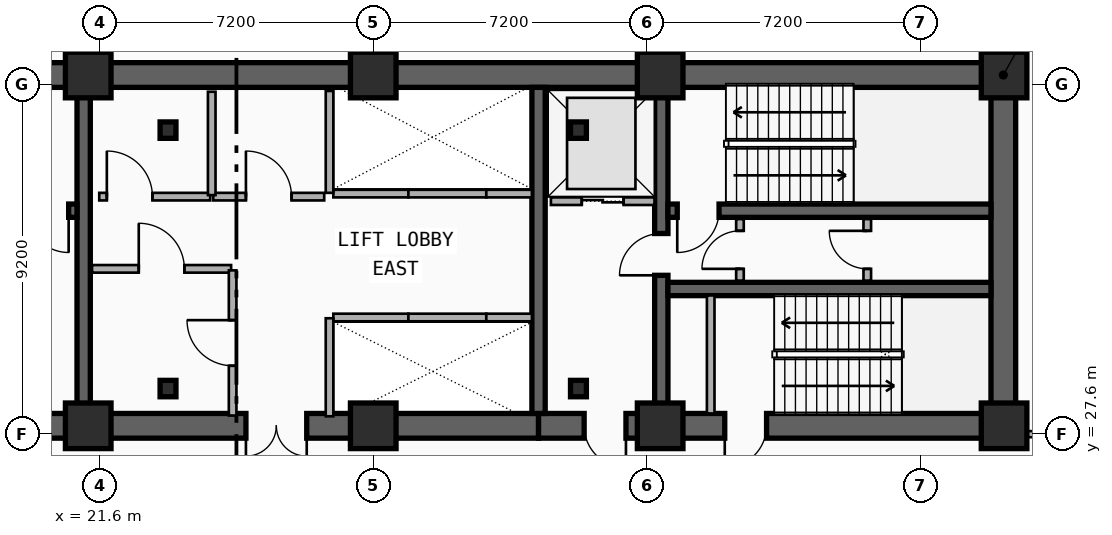
"""IFC4 building model, lengths in metres.
Left out: names, types, materials, properties, quantities, classifications, styles, units other than length and angle.
Written with IfcOpenShell. Run it as: python <this file> out.ifc"""

import sys

from ifc_helpers import new_model, si_unit, direction, frame, frame_2d, origin, origin_2d, place, context, subcontext, project, spatial, rectangle, i_section, extrude, element, fill, save


model = new_model("IFC4")
c1 = context("Model", 3, precision=1e-05, world=origin(), true_north=direction((0.0, 1.0)))
c2 = subcontext(c1, "Body", "Model", "MODEL_VIEW")
j1 = project(units=[si_unit("LENGTHUNIT", "METRE"), si_unit("PLANEANGLEUNIT", "RADIAN")], contexts=[c1])
p1 = place(None, origin())
s1 = spatial("IfcSite", under=j1, at=p1, CompositionType="ELEMENT")
p2 = place(p1, origin())
s2 = spatial("IfcBuilding", under=s1, at=p2, CompositionType="ELEMENT")
p3 = place(p2, frame((0.0, 0.0, 132.9)))
s3 = spatial("IfcBuildingStorey", under=s2, at=p3, CompositionType="ELEMENT", Elevation=132.9)
p4 = place(p3, frame((12.15, 37.05, 0.0), z_axis=(0.0, 0.0, 1.0), x_axis=(1.0, 0.0, 0.0)))
e1 = element("IfcWall", 1, at=p4, inside=s3, PredefinedType="SHEAR", context=c2, shape_type="SweptSolid", body=[
    extrude(rectangle(XDim=33.23, YDim=0.65, at=frame_2d((16.615, 0.0))), origin(), (0.0, 0.0, 1.0), 4.8),
])
p5 = place(p3, frame((21.18, 27.82, 0.0), z_axis=(0.0, 0.0, 1.0), x_axis=(-1.0, 0.0, 0.0)))
e2 = element("IfcWall", 2, at=p5, inside=s3, PredefinedType="SHEAR", context=c2, shape_type="SweptSolid", body=[
    extrude(rectangle(XDim=9.03, YDim=0.65, at=frame_2d((4.515, 0.0))), origin(), (0.0, 0.0, 1.0), 4.8),
])
p6 = place(p5, frame((2.68, 0.0, 0.0)))
e3 = element("IfcOpeningElement", 3, at=p6, cuts=e2, PredefinedType="OPENING", context=c2, shape_type="SweptSolid", body=[
    extrude(rectangle(XDim=1.1, YDim=2.15, at=frame_2d((0.55, 1.075))), frame((0.0, 0.335, 0.0), z_axis=(0.0, -1.0, 0.0), x_axis=(1.0, 0.0, 0.0)), (0.0, 0.0, 1.0), 0.67),
])
p7 = place(p3, frame((33.15, 27.82, 0.0), z_axis=(0.0, 0.0, 1.0), x_axis=(-1.0, 0.0, 0.0)))
e4 = element("IfcWall", 4, at=p7, inside=s3, PredefinedType="SHEAR", context=c2, shape_type="SweptSolid", body=[
    extrude(rectangle(XDim=11.97, YDim=0.65, at=frame_2d((5.985, 0.0))), origin(), (0.0, 0.0, 1.0), 4.8),
])
p8 = place(p7, frame((6.1, 0.0, 0.0)))
e5 = element("IfcOpeningElement", 5, at=p8, cuts=e4, PredefinedType="OPENING", context=c2, shape_type="SweptSolid", body=[
    extrude(rectangle(XDim=1.6, YDim=2.2, at=frame_2d((0.8, 1.1))), frame((0.0, 0.335, 0.0), z_axis=(0.0, -1.0, 0.0), x_axis=(1.0, 0.0, 0.0)), (0.0, 0.0, 1.0), 0.67),
])
p9 = place(p3, frame((45.38, 27.82, 0.0), z_axis=(0.0, 0.0, 1.0), x_axis=(-1.0, 0.0, 0.0)))
e6 = element("IfcWall", 6, at=p9, inside=s3, PredefinedType="SHEAR", context=c2, shape_type="SweptSolid", body=[
    extrude(rectangle(XDim=12.23, YDim=0.65, at=frame_2d((6.115, 0.0))), origin(), (0.0, 0.0, 1.0), 4.8),
])
p10 = place(p9, frame((9.93, 0.0, 0.0)))
e7 = element("IfcOpeningElement", 7, at=p10, cuts=e6, PredefinedType="OPENING", context=c2, shape_type="SweptSolid", body=[
    extrude(rectangle(XDim=1.1, YDim=2.15, at=frame_2d((0.55, 1.075))), frame((0.0, 0.335, 0.0), z_axis=(0.0, -1.0, 0.0), x_axis=(1.0, 0.0, 0.0)), (0.0, 0.0, 1.0), 0.67),
])
p11 = place(p9, frame((6.23, 0.0, 0.0)))
e8 = element("IfcOpeningElement", 8, at=p11, cuts=e6, PredefinedType="OPENING", context=c2, shape_type="SweptSolid", body=[
    extrude(rectangle(XDim=1.1, YDim=2.15, at=frame_2d((0.55, 1.075))), frame((0.0, 0.335, 0.0), z_axis=(0.0, -1.0, 0.0), x_axis=(1.0, 0.0, 0.0)), (0.0, 0.0, 1.0), 0.67),
])
p12 = place(p3, frame((45.38, 28.145, 0.0), z_axis=(0.0, 0.0, 1.0), x_axis=(0.0, 1.0, 0.0)))
e9 = element("IfcWall", 9, at=p12, inside=s3, PredefinedType="SHEAR", context=c2, shape_type="SweptSolid", body=[
    extrude(rectangle(XDim=8.58, YDim=0.65, at=frame_2d((4.29, 0.0))), origin(), (0.0, 0.0, 1.0), 4.8),
])
for number, where, z_axis, x_axis in (
    (10, (21.18, 28.145, 0.0), (0.0, 0.0, 1.0), (0.0, 1.0, 0.0)),
    (11, (33.15, 28.145, 0.0), (0.0, 0.0, 1.0), (0.0, 1.0, 0.0)),
):
    element("IfcWall", number, at=place(p3, frame(where, z_axis=z_axis, x_axis=x_axis)), inside=s3, PredefinedType="SHEAR", context=c2, shape_type="SweptSolid", body=[
        extrude(rectangle(XDim=8.58, YDim=0.35, at=frame_2d((4.29, 0.0))), origin(), (0.0, 0.0, 1.0), 4.8),
    ])
p13 = place(p3, frame((36.38, 28.145, 0.0), z_axis=(0.0, 0.0, 1.0), x_axis=(0.0, 1.0, 0.0)))
e12 = element("IfcWall", 12, at=p13, inside=s3, PredefinedType="SHEAR", context=c2, shape_type="SweptSolid", body=[
    extrude(rectangle(XDim=8.58, YDim=0.35, at=frame_2d((4.29, 0.0))), origin(), (0.0, 0.0, 1.0), 4.8),
])
p14 = place(p13, frame((3.635, 0.0, 0.0)))
e13 = element("IfcOpeningElement", 13, at=p14, cuts=e12, PredefinedType="OPENING", context=c2, shape_type="SweptSolid", body=[
    extrude(rectangle(XDim=1.1, YDim=2.15, at=frame_2d((0.55, 1.075))), frame((0.0, 0.185, 0.0), z_axis=(0.0, -1.0, 0.0), x_axis=(1.0, 0.0, 0.0)), (0.0, 0.0, 1.0), 0.37),
])
p15 = place(p3, frame((21.005, 33.48, 0.0), z_axis=(0.0, 0.0, 1.0), x_axis=(-1.0, 0.0, 0.0)))
e14 = element("IfcWall", 14, at=p15, inside=s3, PredefinedType="SHEAR", context=c2, shape_type="SweptSolid", body=[
    extrude(rectangle(XDim=8.53, YDim=0.35, at=frame_2d((4.265, 0.0))), origin(), (0.0, 0.0, 1.0), 4.8),
])
p16 = place(p15, frame((0.22, 0.0, 0.0)))
e15 = element("IfcOpeningElement", 15, at=p16, cuts=e14, PredefinedType="OPENING", context=c2, shape_type="SweptSolid", body=[
    extrude(rectangle(XDim=1.1, YDim=2.15, at=frame_2d((0.55, 1.075))), frame((0.0, 0.185, 0.0), z_axis=(0.0, -1.0, 0.0), x_axis=(1.0, 0.0, 0.0)), (0.0, 0.0, 1.0), 0.37),
])
p17 = place(p3, frame((45.055, 33.48, 0.0), z_axis=(0.0, 0.0, 1.0), x_axis=(-1.0, 0.0, 0.0)))
e16 = element("IfcWall", 16, at=p17, inside=s3, PredefinedType="SHEAR", context=c2, shape_type="SweptSolid", body=[
    extrude(rectangle(XDim=8.5, YDim=0.35, at=frame_2d((4.25, 0.0))), origin(), (0.0, 0.0, 1.0), 4.8),
])
p18 = place(p17, frame((7.155, 0.0, 0.0)))
e17 = element("IfcOpeningElement", 17, at=p18, cuts=e16, PredefinedType="OPENING", context=c2, shape_type="SweptSolid", body=[
    extrude(rectangle(XDim=1.1, YDim=2.15, at=frame_2d((0.55, 1.075))), frame((0.0, 0.185, 0.0), z_axis=(0.0, -1.0, 0.0), x_axis=(1.0, 0.0, 0.0)), (0.0, 0.0, 1.0), 0.37),
])
p19 = place(p3, frame((36.555, 31.42, 0.0), z_axis=(0.0, 0.0, 1.0), x_axis=(1.0, 0.0, 0.0)))
e18 = element("IfcWall", 18, at=p19, inside=s3, PredefinedType="SHEAR", context=c2, shape_type="SweptSolid", body=[
    extrude(rectangle(XDim=8.5, YDim=0.35, at=frame_2d((4.25, 0.0))), origin(), (0.0, 0.0, 1.0), 4.8),
])
for number, where, z_axis, x_axis in (
    (19, (23.4, 28.8, 0.0), (0.0, 0.0, 1.0), (1.0, 0.0, 0.0)),
    (20, (34.2, 28.8, 0.0), (0.0, 0.0, 1.0), (1.0, 0.0, 0.0)),
    (21, (34.2, 35.6, 0.0), (0.0, 0.0, 1.0), (1.0, 0.0, 0.0)),
    (22, (23.4, 35.6, 0.0), (0.0, 0.0, 1.0), (1.0, 0.0, 0.0)),
):
    element("IfcColumn", number, at=place(p3, frame(where, z_axis=z_axis, x_axis=x_axis)), inside=s3, PredefinedType="COLUMN", context=c2, shape_type="SweptSolid", body=[
        extrude(i_section(OverallWidth=0.418, OverallDepth=0.432, WebThickness=0.035, FlangeThickness=0.056, FilletRadius=0.015, at=origin_2d()), origin(), (0.0, 0.0, 1.0), 4.8),
    ])
for number, where, z_axis, x_axis in (
    (23, (21.3, 27.82, 0.0), (0.0, 0.0, 1.0), (1.0, 0.0, 0.0)),
    (24, (21.3, 37.05, 0.0), (0.0, 0.0, 1.0), (1.0, 0.0, 0.0)),
    (25, (28.8, 27.82, 0.0), (0.0, 0.0, 1.0), (1.0, 0.0, 0.0)),
    (26, (28.8, 37.05, 0.0), (0.0, 0.0, 1.0), (1.0, 0.0, 0.0)),
    (27, (36.35, 27.82, 0.0), (0.0, 0.0, 1.0), (1.0, 0.0, 0.0)),
    (28, (36.35, 37.05, 0.0), (0.0, 0.0, 1.0), (1.0, 0.0, 0.0)),
    (29, (45.4, 27.82, 0.0), (0.0, 0.0, 1.0), (1.0, 0.0, 0.0)),
    (30, (45.4, 37.05, 0.0), (0.0, 0.0, 1.0), (1.0, 0.0, 0.0)),
):
    element("IfcColumn", number, at=place(p3, frame(where, z_axis=z_axis, x_axis=x_axis)), inside=s3, PredefinedType="COLUMN", context=c2, shape_type="SweptSolid", body=[
        extrude(rectangle(XDim=1.2, YDim=1.2, at=origin_2d()), origin(), (0.0, 0.0, 1.0), 4.8),
    ])
p20 = place(p3, frame((33.475, 33.73, 0.0), z_axis=(0.0, 0.0, 1.0), x_axis=(1.0, 0.0, 0.0)))
e31 = element("IfcWall", 31, at=p20, inside=s3, PredefinedType="PARTITIONING", context=c2, shape_type="SweptSolid", body=[
    extrude(rectangle(XDim=2.725, YDim=0.2, at=frame_2d((1.362, 0.0))), origin(), (0.0, 0.0, 1.0), 3.452),
])
p21 = place(p20, frame((0.812, 0.0, 0.0)))
e32 = element("IfcOpeningElement", 32, at=p21, cuts=e31, PredefinedType="OPENING", context=c2, shape_type="SweptSolid", body=[
    extrude(rectangle(XDim=1.1, YDim=2.15, at=frame_2d((0.55, 1.075))), frame((0.0, 0.11, 0.0), z_axis=(0.0, -1.0, 0.0), x_axis=(1.0, 0.0, 0.0)), (0.0, 0.0, 1.0), 0.22),
])
p22 = place(p3, frame((27.75, 30.67, 0.0), z_axis=(0.0, 0.0, 1.0), x_axis=(1.0, 0.0, 0.0)))
e33 = element("IfcWall", 33, at=p22, inside=s3, PredefinedType="PARTITIONING", context=c2, shape_type="SweptSolid", body=[
    extrude(rectangle(XDim=1.975, YDim=0.2, at=frame_2d((0.988, 0.0))), origin(), (0.0, 0.0, 1.0), 3.452),
])
p23 = place(p3, frame((27.65, 28.07, 0.0), z_axis=(0.0, 0.0, 1.0), x_axis=(0.0, 1.0, 0.0)))
e34 = element("IfcWall", 34, at=p23, inside=s3, PredefinedType="PARTITIONING", context=c2, shape_type="SweptSolid", body=[
    extrude(rectangle(XDim=2.58, YDim=0.2, at=frame_2d((1.29, 0.0))), origin(), (0.0, 0.0, 1.0), 3.452),
])
p24 = place(p3, frame((29.725, 30.67, 0.0), z_axis=(0.0, 0.0, 1.0), x_axis=(1.0, 0.0, 0.0)))
e35 = element("IfcWall", 35, at=p24, inside=s3, PredefinedType="PARTITIONING", context=c2, shape_type="SweptSolid", body=[
    extrude(rectangle(XDim=2.05, YDim=0.2, at=frame_2d((1.025, 0.0))), origin(), (0.0, 0.0, 1.0), 3.86),
])
p25 = place(p3, frame((31.775, 30.67, 0.0), z_axis=(0.0, 0.0, 1.0), x_axis=(1.0, 0.0, 0.0)))
e36 = element("IfcWall", 36, at=p25, inside=s3, PredefinedType="PARTITIONING", context=c2, shape_type="SweptSolid", body=[
    extrude(rectangle(XDim=1.2, YDim=0.2, at=frame_2d((0.6, 0.0))), origin(), (0.0, 0.0, 1.0), 3.86),
])
p26 = place(p3, frame((27.75, 33.93, 0.0), z_axis=(0.0, 0.0, 1.0), x_axis=(1.0, 0.0, 0.0)))
e37 = element("IfcWall", 37, at=p26, inside=s3, PredefinedType="PARTITIONING", context=c2, shape_type="SweptSolid", body=[
    extrude(rectangle(XDim=1.975, YDim=0.2, at=frame_2d((0.988, 0.0))), origin(), (0.0, 0.0, 1.0), 3.452),
])
p27 = place(p3, frame((27.65, 33.95, 0.0), z_axis=(0.0, 0.0, 1.0), x_axis=(0.0, 1.0, 0.0)))
e38 = element("IfcWall", 38, at=p27, inside=s3, PredefinedType="PARTITIONING", context=c2, shape_type="SweptSolid", body=[
    extrude(rectangle(XDim=2.68, YDim=0.2, at=frame_2d((1.34, 0.0))), origin(), (0.0, 0.0, 1.0), 3.452),
])
p28 = place(p3, frame((29.725, 33.93, 0.0), z_axis=(0.0, 0.0, 1.0), x_axis=(1.0, 0.0, 0.0)))
e39 = element("IfcWall", 39, at=p28, inside=s3, PredefinedType="PARTITIONING", context=c2, shape_type="SweptSolid", body=[
    extrude(rectangle(XDim=2.05, YDim=0.2, at=frame_2d((1.025, 0.0))), origin(), (0.0, 0.0, 1.0), 4.48),
])
p29 = place(p3, frame((31.775, 33.93, 0.0), z_axis=(0.0, 0.0, 1.0), x_axis=(1.0, 0.0, 0.0)))
e40 = element("IfcWall", 40, at=p29, inside=s3, PredefinedType="PARTITIONING", context=c2, shape_type="SweptSolid", body=[
    extrude(rectangle(XDim=1.2, YDim=0.2, at=frame_2d((0.6, 0.0))), origin(), (0.0, 0.0, 1.0), 4.48),
])
p30 = place(p3, frame((37.68, 28.145, 0.0), z_axis=(0.0, 0.0, 1.0), x_axis=(0.0, 1.0, 0.0)))
e41 = element("IfcWall", 41, at=p30, inside=s3, PredefinedType="PARTITIONING", context=c2, shape_type="SweptSolid", body=[
    extrude(rectangle(XDim=3.105, YDim=0.2, at=frame_2d((1.552, 0.0))), origin(), (0.0, 0.0, 1.0), 3.86),
])
p31 = place(p3, frame((38.45, 31.64, 0.0), z_axis=(0.0, 0.0, 1.0), x_axis=(0.0, 1.0, 0.0)))
e42 = element("IfcWall", 42, at=p31, inside=s3, PredefinedType="PARTITIONING", context=c2, shape_type="SweptSolid", body=[
    extrude(rectangle(XDim=1.62, YDim=0.2, at=frame_2d((0.81, 0.0))), origin(), (0.0, 0.0, 1.0), 4.48),
])
p32 = place(p31, frame((0.31, 0.0, 0.0)))
e43 = element("IfcOpeningElement", 43, at=p32, cuts=e42, PredefinedType="OPENING", context=c2, shape_type="SweptSolid", body=[
    extrude(rectangle(XDim=1.0, YDim=2.15, at=frame_2d((0.5, 1.075))), frame((0.0, 0.11, 0.0), z_axis=(0.0, -1.0, 0.0), x_axis=(1.0, 0.0, 0.0)), (0.0, 0.0, 1.0), 0.22),
])
p33 = place(p3, frame((41.8, 31.64, 0.0), z_axis=(0.0, 0.0, 1.0), x_axis=(0.0, 1.0, 0.0)))
e44 = element("IfcWall", 44, at=p33, inside=s3, PredefinedType="PARTITIONING", context=c2, shape_type="SweptSolid", body=[
    extrude(rectangle(XDim=1.62, YDim=0.2, at=frame_2d((0.81, 0.0))), origin(), (0.0, 0.0, 1.0), 4.48),
])
p34 = place(p33, frame((0.31, 0.0, 0.0)))
e45 = element("IfcOpeningElement", 45, at=p34, cuts=e44, PredefinedType="OPENING", context=c2, shape_type="SweptSolid", body=[
    extrude(rectangle(XDim=1.0, YDim=2.15, at=frame_2d((0.5, 1.075))), frame((0.0, 0.11, 0.0), z_axis=(0.0, -1.0, 0.0), x_axis=(1.0, 0.0, 0.0)), (0.0, 0.0, 1.0), 0.22),
])
p35 = place(p3, frame((21.4, 31.95, 0.0), z_axis=(0.0, 0.0, 1.0), x_axis=(1.0, 0.0, 0.0)))
e46 = element("IfcWall", 46, at=p35, inside=s3, PredefinedType="PARTITIONING", context=c2, shape_type="SweptSolid", body=[
    extrude(rectangle(XDim=3.66, YDim=0.2, at=frame_2d((1.83, 0.0))), origin(), (0.0, 0.0, 1.0), 3.452),
])
p36 = place(p35, frame((1.23, 0.0, 0.0)))
e47 = element("IfcOpeningElement", 47, at=p36, cuts=e46, PredefinedType="OPENING", context=c2, shape_type="SweptSolid", body=[
    extrude(rectangle(XDim=1.2, YDim=2.15, at=frame_2d((0.6, 1.075))), frame((0.0, 0.11, 0.0), z_axis=(0.0, -1.0, 0.0), x_axis=(1.0, 0.0, 0.0)), (0.0, 0.0, 1.0), 0.22),
])
p37 = place(p3, frame((21.59, 33.85, 0.0), z_axis=(0.0, 0.0, 1.0), x_axis=(1.0, 0.0, 0.0)))
e48 = element("IfcWall", 48, at=p37, inside=s3, PredefinedType="PARTITIONING", context=c2, shape_type="SweptSolid", body=[
    extrude(rectangle(XDim=2.92, YDim=0.2, at=frame_2d((1.46, 0.0))), origin(), (0.0, 0.0, 1.0), 3.452),
])
p38 = place(p37, frame((0.2, 0.0, 0.0)))
e49 = element("IfcOpeningElement", 49, at=p38, cuts=e48, PredefinedType="OPENING", context=c2, shape_type="SweptSolid", body=[
    extrude(rectangle(XDim=1.2, YDim=2.15, at=frame_2d((0.6, 1.075))), frame((0.0, 0.11, 0.0), z_axis=(0.0, -1.0, 0.0), x_axis=(1.0, 0.0, 0.0)), (0.0, 0.0, 1.0), 0.22),
])
p39 = place(p3, frame((24.59, 33.85, 0.0), z_axis=(0.0, 0.0, 1.0), x_axis=(1.0, 0.0, 0.0)))
e50 = element("IfcWall", 50, at=p39, inside=s3, PredefinedType="PARTITIONING", context=c2, shape_type="SweptSolid", body=[
    extrude(rectangle(XDim=2.92, YDim=0.2, at=frame_2d((1.46, 0.0))), origin(), (0.0, 0.0, 1.0), 4.48),
])
p40 = place(p39, frame((0.86, 0.0, 0.0)))
e51 = element("IfcOpeningElement", 51, at=p40, cuts=e50, PredefinedType="OPENING", context=c2, shape_type="SweptSolid", body=[
    extrude(rectangle(XDim=1.2, YDim=2.15, at=frame_2d((0.6, 1.075))), frame((0.0, 0.11, 0.0), z_axis=(0.0, -1.0, 0.0), x_axis=(1.0, 0.0, 0.0)), (0.0, 0.0, 1.0), 0.22),
])
p41 = place(p3, frame((25.1, 28.09, 0.0), z_axis=(0.0, 0.0, 1.0), x_axis=(0.0, 1.0, 0.0)))
e52 = element("IfcWall", 52, at=p41, inside=s3, PredefinedType="PARTITIONING", context=c2, shape_type="SweptSolid", body=[
    extrude(rectangle(XDim=3.82, YDim=0.2, at=frame_2d((1.91, 0.0))), origin(), (0.0, 0.0, 1.0), 3.86),
])
p42 = place(p41, frame((1.31, 0.0, 0.0)))
e53 = element("IfcOpeningElement", 53, at=p42, cuts=e52, PredefinedType="OPENING", context=c2, shape_type="SweptSolid", body=[
    extrude(rectangle(XDim=1.2, YDim=2.15, at=frame_2d((0.6, 1.075))), frame((0.0, 0.11, 0.0), z_axis=(0.0, -1.0, 0.0), x_axis=(1.0, 0.0, 0.0)), (0.0, 0.0, 1.0), 0.22),
])
p43 = place(p3, frame((24.55, 33.89, 0.0), z_axis=(0.0, 0.0, 1.0), x_axis=(0.0, 1.0, 0.0)))
e54 = element("IfcWall", 54, at=p43, inside=s3, PredefinedType="PARTITIONING", context=c2, shape_type="SweptSolid", body=[
    extrude(rectangle(XDim=2.72, YDim=0.2, at=frame_2d((1.36, 0.0))), origin(), (0.0, 0.0, 1.0), 4.48),
])
p44 = place(p3, frame((45.41, 27.6, 0.0), z_axis=(0.0, 0.0, 1.0), x_axis=(1.0, 0.0, 0.0)))
e55 = element("IfcWall", 55, at=p44, inside=s3, PredefinedType="PARTITIONING", context=c2, shape_type="SweptSolid", body=[
    extrude(rectangle(XDim=0.91, YDim=0.16, at=frame_2d((0.455, 0.0))), origin(), (0.0, 0.0, 1.0), 3.452),
])
p45 = place(p21, origin())
e56 = element("IfcDoor", 56, at=p45, inside=s3, OperationType="DOUBLE_DOOR_SLIDING", PredefinedType="DOOR", context=c2, shape_type="SweptSolid", body=[
    extrude(rectangle(XDim=1.1, YDim=2.15, at=frame_2d((0.55, 1.075))), frame((0.0, 0.025, 0.0), z_axis=(0.0, -1.0, 0.0), x_axis=(1.0, 0.0, 0.0)), (0.0, 0.0, 1.0), 0.05),
])
fill(e32, e56)
p46 = place(p16, origin())
e57 = element("IfcDoor", 57, at=p46, inside=s3, OperationType="SINGLE_SWING_LEFT", PredefinedType="DOOR", context=c2, shape_type="SweptSolid", body=[
    extrude(rectangle(XDim=1.1, YDim=2.15, at=frame_2d((0.55, 1.075))), frame((0.0, 0.025, 0.0), z_axis=(0.0, -1.0, 0.0), x_axis=(1.0, 0.0, 0.0)), (0.0, 0.0, 1.0), 0.05),
])
fill(e15, e57)
p47 = place(p18, origin())
e58 = element("IfcDoor", 58, at=p47, inside=s3, OperationType="SINGLE_SWING_RIGHT", PredefinedType="DOOR", context=c2, shape_type="SweptSolid", body=[
    extrude(rectangle(XDim=1.1, YDim=2.15, at=frame_2d((0.55, 1.075))), frame((0.0, 0.025, 0.0), z_axis=(0.0, -1.0, 0.0), x_axis=(1.0, 0.0, 0.0)), (0.0, 0.0, 1.0), 0.05),
])
fill(e17, e58)
p48 = place(p14, origin())
e59 = element("IfcDoor", 59, at=p48, inside=s3, OperationType="SINGLE_SWING_LEFT", PredefinedType="DOOR", context=c2, shape_type="SweptSolid", body=[
    extrude(rectangle(XDim=1.1, YDim=2.15, at=frame_2d((0.55, 1.075))), frame((0.0, 0.025, 0.0), z_axis=(0.0, -1.0, 0.0), x_axis=(1.0, 0.0, 0.0)), (0.0, 0.0, 1.0), 0.05),
])
fill(e13, e59)
p49 = place(p10, origin())
e60 = element("IfcDoor", 60, at=p49, inside=s3, OperationType="SINGLE_SWING_LEFT", PredefinedType="DOOR", context=c2, shape_type="SweptSolid", body=[
    extrude(rectangle(XDim=1.1, YDim=2.15, at=frame_2d((0.55, 1.075))), frame((0.0, 0.025, 0.0), z_axis=(0.0, -1.0, 0.0), x_axis=(1.0, 0.0, 0.0)), (0.0, 0.0, 1.0), 0.05),
])
fill(e7, e60)
p50 = place(p11, origin())
e61 = element("IfcDoor", 61, at=p50, inside=s3, OperationType="SINGLE_SWING_RIGHT", PredefinedType="DOOR", context=c2, shape_type="SweptSolid", body=[
    extrude(rectangle(XDim=1.1, YDim=2.15, at=frame_2d((0.55, 1.075))), frame((0.0, 0.025, 0.0), z_axis=(0.0, -1.0, 0.0), x_axis=(1.0, 0.0, 0.0)), (0.0, 0.0, 1.0), 0.05),
])
fill(e8, e61)
p51 = place(p8, origin())
e62 = element("IfcDoor", 62, at=p51, inside=s3, OperationType="SINGLE_SWING_LEFT", PredefinedType="DOOR", context=c2, shape_type="SweptSolid", body=[
    extrude(rectangle(XDim=1.6, YDim=2.2, at=frame_2d((0.8, 1.1))), frame((0.0, 0.025, 0.0), z_axis=(0.0, -1.0, 0.0), x_axis=(1.0, 0.0, 0.0)), (0.0, 0.0, 1.0), 0.05),
])
fill(e5, e62)
p52 = place(p32, origin())
e63 = element("IfcDoor", 63, at=p52, inside=s3, OperationType="SINGLE_SWING_LEFT", PredefinedType="DOOR", context=c2, shape_type="SweptSolid", body=[
    extrude(rectangle(XDim=1.0, YDim=2.15, at=frame_2d((0.5, 1.075))), frame((0.0, 0.025, 0.0), z_axis=(0.0, -1.0, 0.0), x_axis=(1.0, 0.0, 0.0)), (0.0, 0.0, 1.0), 0.05),
])
fill(e43, e63)
p53 = place(p34, origin())
e64 = element("IfcDoor", 64, at=p53, inside=s3, OperationType="SINGLE_SWING_RIGHT", PredefinedType="DOOR", context=c2, shape_type="SweptSolid", body=[
    extrude(rectangle(XDim=1.0, YDim=2.15, at=frame_2d((0.5, 1.075))), frame((0.0, 0.025, 0.0), z_axis=(0.0, -1.0, 0.0), x_axis=(1.0, 0.0, 0.0)), (0.0, 0.0, 1.0), 0.05),
])
fill(e45, e64)
p54 = place(p36, origin())
e65 = element("IfcDoor", 65, at=p54, inside=s3, OperationType="SINGLE_SWING_LEFT", PredefinedType="DOOR", context=c2, shape_type="SweptSolid", body=[
    extrude(rectangle(XDim=1.2, YDim=2.15, at=frame_2d((0.6, 1.075))), frame((0.0, 0.025, 0.0), z_axis=(0.0, -1.0, 0.0), x_axis=(1.0, 0.0, 0.0)), (0.0, 0.0, 1.0), 0.05),
])
fill(e47, e65)
p55 = place(p38, origin())
e66 = element("IfcDoor", 66, at=p55, inside=s3, OperationType="SINGLE_SWING_LEFT", PredefinedType="DOOR", context=c2, shape_type="SweptSolid", body=[
    extrude(rectangle(XDim=1.2, YDim=2.15, at=frame_2d((0.6, 1.075))), frame((0.0, 0.025, 0.0), z_axis=(0.0, -1.0, 0.0), x_axis=(1.0, 0.0, 0.0)), (0.0, 0.0, 1.0), 0.05),
])
fill(e49, e66)
p56 = place(p40, origin())
e67 = element("IfcDoor", 67, at=p56, inside=s3, OperationType="SINGLE_SWING_LEFT", PredefinedType="DOOR", context=c2, shape_type="SweptSolid", body=[
    extrude(rectangle(XDim=1.2, YDim=2.15, at=frame_2d((0.6, 1.075))), frame((0.0, 0.025, 0.0), z_axis=(0.0, -1.0, 0.0), x_axis=(1.0, 0.0, 0.0)), (0.0, 0.0, 1.0), 0.05),
])
fill(e51, e67)
p57 = place(p42, origin())
e68 = element("IfcDoor", 68, at=p57, inside=s3, OperationType="SINGLE_SWING_RIGHT", PredefinedType="DOOR", context=c2, shape_type="SweptSolid", body=[
    extrude(rectangle(XDim=1.2, YDim=2.15, at=frame_2d((0.6, 1.075))), frame((0.0, 0.025, 0.0), z_axis=(0.0, -1.0, 0.0), x_axis=(1.0, 0.0, 0.0)), (0.0, 0.0, 1.0), 0.05),
])
fill(e53, e68)
save(model, sys.argv[1])
